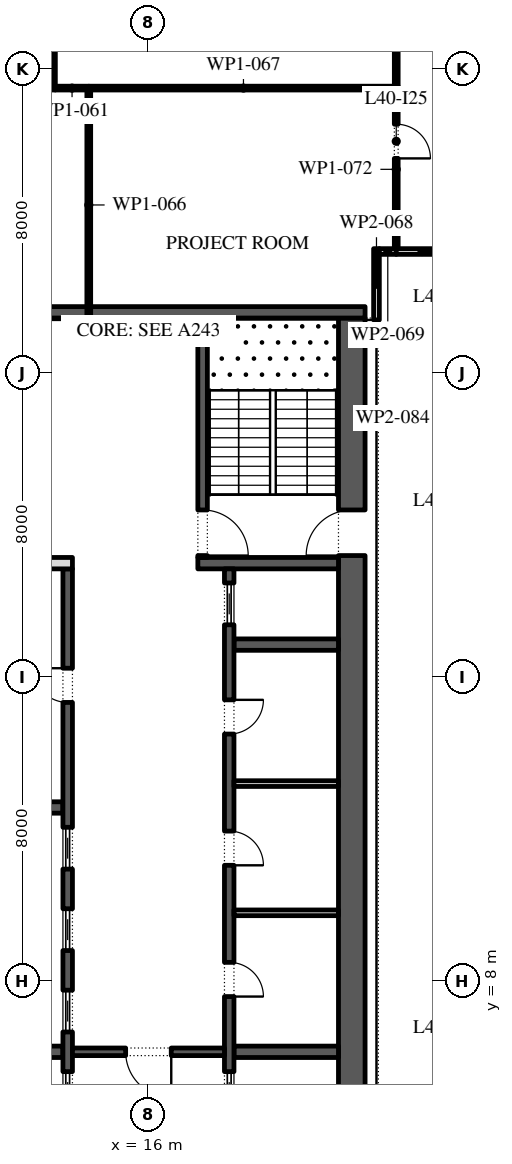
"""IFC4 building model, lengths in metres.
Left out: names, types, materials, properties, quantities, classifications, styles, units other than length and angle.
Written with IfcOpenShell. Run it as: python <this file> out.ifc"""

import sys

from ifc_helpers import new_model, si_unit, direction, frame, frame_2d, origin, place, context, subcontext, project, spatial, rectangle, extrude, element, fill, save


model = new_model("IFC4")
c1 = context("Model", 3, precision=1e-05, world=origin(), true_north=direction((0.0, 1.0)))
c2 = subcontext(c1, "Body", "Model", "MODEL_VIEW")
j1 = project(units=[si_unit("LENGTHUNIT", "METRE"), si_unit("PLANEANGLEUNIT", "RADIAN")], contexts=[c1])
p1 = place(None, origin())
s1 = spatial("IfcSite", under=j1, at=p1, CompositionType="ELEMENT")
p2 = place(p1, origin())
s2 = spatial("IfcBuilding", under=s1, at=p2, CompositionType="ELEMENT")
p3 = place(p2, frame((0.0, 0.0, 184.2)))
s3 = spatial("IfcBuildingStorey", under=s2, at=p3, CompositionType="ELEMENT", Elevation=184.2)
p4 = place(p3, frame((33.157, -5.092, 0.0), z_axis=(0.0, 0.0, 1.0), x_axis=(-0.224950279389, 0.974370243697, 0.0)))
e1 = element("IfcWall", 1, at=p4, inside=s3, PredefinedType="STANDARD", context=c2, shape_type="SweptSolid", body=[
    extrude(rectangle(XDim=49.5, YDim=0.3, at=frame_2d((24.75, 0.0))), origin(), (0.0, 0.0, 1.0), 4.0),
])
p5 = place(p4, frame((2.207, 0.0, 0.0)))
e2 = element("IfcOpeningElement", 2, at=p5, cuts=e1, PredefinedType="OPENING", context=c2, shape_type="SweptSolid", body=[
    extrude(rectangle(XDim=2.4, YDim=3.125, at=frame_2d((1.2, 1.562))), frame((0.0, 0.16, 0.0), z_axis=(0.0, -1.0, 0.0), x_axis=(1.0, 0.0, 0.0)), (0.0, 0.0, 1.0), 0.32),
])
p6 = place(p4, frame((8.121, 0.0, 0.45)))
e3 = element("IfcOpeningElement", 3, at=p6, cuts=e1, PredefinedType="OPENING", context=c2, shape_type="SweptSolid", body=[
    extrude(rectangle(XDim=4.5, YDim=2.875, at=frame_2d((2.25, 1.438))), frame((0.0, 0.16, 0.0), z_axis=(0.0, -1.0, 0.0), x_axis=(1.0, 0.0, 0.0)), (0.0, 0.0, 1.0), 0.32),
])
p7 = place(p4, frame((15.236, 0.0, 0.45)))
e4 = element("IfcOpeningElement", 4, at=p7, cuts=e1, PredefinedType="OPENING", context=c2, shape_type="SweptSolid", body=[
    extrude(rectangle(XDim=4.5, YDim=2.875, at=frame_2d((2.25, 1.438))), frame((0.0, 0.16, 0.0), z_axis=(0.0, -1.0, 0.0), x_axis=(1.0, 0.0, 0.0)), (0.0, 0.0, 1.0), 0.32),
])
p8 = place(p4, frame((22.35, 0.0, 0.45)))
e5 = element("IfcOpeningElement", 5, at=p8, cuts=e1, PredefinedType="OPENING", context=c2, shape_type="SweptSolid", body=[
    extrude(rectangle(XDim=4.5, YDim=3.0, at=frame_2d((2.25, 1.5))), frame((0.0, 0.16, 0.0), z_axis=(0.0, -1.0, 0.0), x_axis=(1.0, 0.0, 0.0)), (0.0, 0.0, 1.0), 0.32),
])
p9 = place(p4, frame((30.514, 0.0, 0.0)))
e6 = element("IfcOpeningElement", 6, at=p9, cuts=e1, PredefinedType="OPENING", context=c2, shape_type="SweptSolid", body=[
    extrude(rectangle(XDim=2.4, YDim=3.45, at=frame_2d((1.2, 1.725))), frame((0.0, 0.16, 0.0), z_axis=(0.0, -1.0, 0.0), x_axis=(1.0, 0.0, 0.0)), (0.0, 0.0, 1.0), 0.32),
])
p10 = place(p4, frame((36.579, 0.0, 0.45)))
e7 = element("IfcOpeningElement", 7, at=p10, cuts=e1, PredefinedType="OPENING", context=c2, shape_type="SweptSolid", body=[
    extrude(rectangle(XDim=4.5, YDim=3.05, at=frame_2d((2.25, 1.525))), frame((0.0, 0.16, 0.0), z_axis=(0.0, -1.0, 0.0), x_axis=(1.0, 0.0, 0.0)), (0.0, 0.0, 1.0), 0.32),
])
p11 = place(p4, frame((43.693, 0.0, 0.45)))
e8 = element("IfcOpeningElement", 8, at=p11, cuts=e1, PredefinedType="OPENING", context=c2, shape_type="SweptSolid", body=[
    extrude(rectangle(XDim=4.5, YDim=3.05, at=frame_2d((2.25, 1.525))), frame((0.0, 0.16, 0.0), z_axis=(0.0, -1.0, 0.0), x_axis=(1.0, 0.0, 0.0)), (0.0, 0.0, 1.0), 0.32),
])
p12 = place(p3, frame((21.35, -2.45, 0.0), z_axis=(0.0, 0.0, 1.0), x_axis=(0.0, 1.0, 0.0)))
e9 = element("IfcWall", 9, at=p12, inside=s3, PredefinedType="SHEAR", context=c2, shape_type="SweptSolid", body=[
    extrude(rectangle(XDim=27.9, YDim=0.7, at=frame_2d((13.95, 0.0))), origin(), (0.0, 0.0, 1.0), 4.0),
])
p13 = place(p12, frame((5.05, 0.0, 0.0)))
e10 = element("IfcOpeningElement", 10, at=p13, cuts=e9, PredefinedType="OPENING", context=c2, shape_type="SweptSolid", body=[
    extrude(rectangle(XDim=1.2, YDim=2.1, at=frame_2d((0.6, 1.05))), frame((0.0, 0.36, 0.0), z_axis=(0.0, -1.0, 0.0), x_axis=(1.0, 0.0, 0.0)), (0.0, 0.0, 1.0), 0.72),
])
p14 = place(p12, frame((21.65, 0.0, 0.0)))
e11 = element("IfcOpeningElement", 11, at=p14, cuts=e9, PredefinedType="OPENING", context=c2, shape_type="SweptSolid", body=[
    extrude(rectangle(XDim=1.2, YDim=2.1, at=frame_2d((0.6, 1.05))), frame((0.0, 0.36, 0.0), z_axis=(0.0, -1.0, 0.0), x_axis=(1.0, 0.0, 0.0)), (0.0, 0.0, 1.0), 0.72),
])
p15 = place(p3, frame((10.3, 25.6, 0.0), z_axis=(0.0, 0.0, 1.0), x_axis=(1.0, 0.0, 0.0)))
e12 = element("IfcWall", 12, at=p15, inside=s3, PredefinedType="SHEAR", context=c2, shape_type="SweptSolid", body=[
    extrude(rectangle(XDim=11.4, YDim=0.3, at=frame_2d((5.7, 0.0))), origin(), (0.0, 0.0, 1.0), 4.0),
])
p16 = place(p3, frame((17.3, 19.0, 0.0), z_axis=(0.0, 0.0, 1.0), x_axis=(1.0, 0.0, 0.0)))
e13 = element("IfcWall", 13, at=p16, inside=s3, PredefinedType="SHEAR", context=c2, shape_type="SweptSolid", body=[
    extrude(rectangle(XDim=3.7, YDim=0.3, at=frame_2d((1.85, 0.0))), origin(), (0.0, 0.0, 1.0), 4.0),
])
p17 = place(p3, frame((17.425, 19.15, 0.0), z_axis=(0.0, 0.0, 1.0), x_axis=(0.0, 1.0, 0.0)))
e14 = element("IfcWall", 14, at=p17, inside=s3, PredefinedType="SHEAR", context=c2, shape_type="SweptSolid", body=[
    extrude(rectangle(XDim=6.3, YDim=0.25, at=frame_2d((3.15, 0.0))), origin(), (0.0, 0.0, 1.0), 4.0),
])
p18 = place(p17, frame((0.05, 0.0, 0.0)))
e15 = element("IfcOpeningElement", 15, at=p18, cuts=e14, PredefinedType="OPENING", context=c2, shape_type="SweptSolid", body=[
    extrude(rectangle(XDim=1.2, YDim=2.1, at=frame_2d((0.6, 1.05))), frame((0.0, 0.135, 0.0), z_axis=(0.0, -1.0, 0.0), x_axis=(1.0, 0.0, 0.0)), (0.0, 0.0, 1.0), 0.27),
])
for number, where, z_axis, x_axis in (
    (16, (18.25, 6.143, 0.0), (0.0, 0.0, 1.0), (1.0, 0.0, 0.0)),
    (17, (18.25, 16.857, 0.0), (0.0, 0.0, 1.0), (1.0, 0.0, 0.0)),
):
    element("IfcWall", number, at=place(p3, frame(where, z_axis=z_axis, x_axis=x_axis)), inside=s3, PredefinedType="SHEAR", context=c2, shape_type="SweptSolid", body=[
        extrude(rectangle(XDim=2.75, YDim=0.3, at=frame_2d((1.375, 0.0))), origin(), (0.0, 0.0, 1.0), 4.0),
    ])
p19 = place(p3, frame((18.125, 4.15, 0.0), z_axis=(0.0, 0.0, 1.0), x_axis=(0.0, 1.0, 0.0)))
e18 = element("IfcWall", 18, at=p19, inside=s3, PredefinedType="SHEAR", context=c2, shape_type="SweptSolid", body=[
    extrude(rectangle(XDim=14.7, YDim=0.25, at=frame_2d((7.35, 0.0))), origin(), (0.0, 0.0, 1.0), 4.0),
])
p20 = place(p19, frame((3.446, 0.0, 0.0)))
e19 = element("IfcOpeningElement", 19, at=p20, cuts=e18, PredefinedType="OPENING", context=c2, shape_type="SweptSolid", body=[
    extrude(rectangle(XDim=0.9, YDim=2.1, at=frame_2d((0.45, 1.05))), frame((0.0, 0.135, 0.0), z_axis=(0.0, -1.0, 0.0), x_axis=(1.0, 0.0, 0.0)), (0.0, 0.0, 1.0), 0.27),
])
p21 = place(p19, frame((6.9, 0.0, 0.0)))
e20 = element("IfcOpeningElement", 20, at=p21, cuts=e18, PredefinedType="OPENING", context=c2, shape_type="SweptSolid", body=[
    extrude(rectangle(XDim=0.9, YDim=2.1, at=frame_2d((0.45, 1.05))), frame((0.0, 0.135, 0.0), z_axis=(0.0, -1.0, 0.0), x_axis=(1.0, 0.0, 0.0)), (0.0, 0.0, 1.0), 0.27),
])
p22 = place(p19, frame((10.354, 0.0, 0.0)))
e21 = element("IfcOpeningElement", 21, at=p22, cuts=e18, PredefinedType="OPENING", context=c2, shape_type="SweptSolid", body=[
    extrude(rectangle(XDim=0.9, YDim=2.1, at=frame_2d((0.45, 1.05))), frame((0.0, 0.135, 0.0), z_axis=(0.0, -1.0, 0.0), x_axis=(1.0, 0.0, 0.0)), (0.0, 0.0, 1.0), 0.27),
])
p23 = place(p19, frame((0.371, 0.0, 0.0)))
e22 = element("IfcOpeningElement", 22, at=p23, cuts=e18, PredefinedType="OPENING", context=c2, shape_type="SweptSolid", body=[
    extrude(rectangle(XDim=1.1, YDim=2.1, at=frame_2d((0.55, 1.05))), frame((0.0, 0.135, 0.0), z_axis=(0.0, -1.0, 0.0), x_axis=(1.0, 0.0, 0.0)), (0.0, 0.0, 1.0), 0.27),
])
p24 = place(p19, frame((13.229, 0.0, 0.0)))
e23 = element("IfcOpeningElement", 23, at=p24, cuts=e18, PredefinedType="OPENING", context=c2, shape_type="SweptSolid", body=[
    extrude(rectangle(XDim=1.1, YDim=2.1, at=frame_2d((0.55, 1.05))), frame((0.0, 0.135, 0.0), z_axis=(0.0, -1.0, 0.0), x_axis=(1.0, 0.0, 0.0)), (0.0, 0.0, 1.0), 0.27),
])
for number, where, z_axis, x_axis in (
    (24, (18.25, 9.8, 0.0), (0.0, 0.0, 1.0), (1.0, 0.0, 0.0)),
    (25, (18.25, 13.2, 0.0), (0.0, 0.0, 1.0), (1.0, 0.0, 0.0)),
):
    element("IfcWall", number, at=place(p3, frame(where, z_axis=z_axis, x_axis=x_axis)), inside=s3, PredefinedType="PARTITIONING", context=c2, shape_type="SweptSolid", body=[
        extrude(rectangle(XDim=2.75, YDim=0.15, at=frame_2d((1.375, 0.0))), origin(), (0.0, 0.0, 1.0), 4.0),
    ])
for number, where, z_axis, x_axis in (
    (26, (11.0, 6.143, 0.0), (0.0, 0.0, 1.0), (1.0, 0.0, 0.0)),
    (27, (11.0, 12.571, 0.0), (0.0, 0.0, 1.0), (1.0, 0.0, 0.0)),
):
    element("IfcWall", number, at=place(p3, frame(where, z_axis=z_axis, x_axis=x_axis)), inside=s3, PredefinedType="SHEAR", context=c2, shape_type="SweptSolid", body=[
        extrude(rectangle(XDim=2.75, YDim=0.3, at=frame_2d((1.375, 0.0))), origin(), (0.0, 0.0, 1.0), 4.0),
    ])
p25 = place(p3, frame((13.875, -2.45, 0.0), z_axis=(0.0, 0.0, 1.0), x_axis=(0.0, 1.0, 0.0)))
e28 = element("IfcWall", 28, at=p25, inside=s3, PredefinedType="SHEAR", context=c2, shape_type="SweptSolid", body=[
    extrude(rectangle(XDim=21.3, YDim=0.25, at=frame_2d((10.65, 0.0))), origin(), (0.0, 0.0, 1.0), 4.0),
])
p26 = place(p25, frame((17.786, 0.0, 0.0)))
e29 = element("IfcOpeningElement", 29, at=p26, cuts=e28, PredefinedType="OPENING", context=c2, shape_type="SweptSolid", body=[
    extrude(rectangle(XDim=0.9, YDim=2.1, at=frame_2d((0.45, 1.05))), frame((0.0, 0.135, 0.0), z_axis=(0.0, -1.0, 0.0), x_axis=(1.0, 0.0, 0.0)), (0.0, 0.0, 1.0), 0.27),
])
p27 = place(p25, frame((6.971, 0.0, 0.0)))
e30 = element("IfcOpeningElement", 30, at=p27, cuts=e28, PredefinedType="OPENING", context=c2, shape_type="SweptSolid", body=[
    extrude(rectangle(XDim=1.1, YDim=2.1, at=frame_2d((0.55, 1.05))), frame((0.0, 0.135, 0.0), z_axis=(0.0, -1.0, 0.0), x_axis=(1.0, 0.0, 0.0)), (0.0, 0.0, 1.0), 0.27),
])
p28 = place(p25, frame((9.114, 0.0, 0.0)))
e31 = element("IfcOpeningElement", 31, at=p28, cuts=e28, PredefinedType="OPENING", context=c2, shape_type="SweptSolid", body=[
    extrude(rectangle(XDim=1.1, YDim=2.1, at=frame_2d((0.55, 1.05))), frame((0.0, 0.135, 0.0), z_axis=(0.0, -1.0, 0.0), x_axis=(1.0, 0.0, 0.0)), (0.0, 0.0, 1.0), 0.27),
])
p29 = place(p25, frame((11.257, 0.0, 0.0)))
e32 = element("IfcOpeningElement", 32, at=p29, cuts=e28, PredefinedType="OPENING", context=c2, shape_type="SweptSolid", body=[
    extrude(rectangle(XDim=1.1, YDim=2.1, at=frame_2d((0.55, 1.05))), frame((0.0, 0.135, 0.0), z_axis=(0.0, -1.0, 0.0), x_axis=(1.0, 0.0, 0.0)), (0.0, 0.0, 1.0), 0.27),
])
p30 = place(p25, frame((13.4, 0.0, 0.0)))
e33 = element("IfcOpeningElement", 33, at=p30, cuts=e28, PredefinedType="OPENING", context=c2, shape_type="SweptSolid", body=[
    extrude(rectangle(XDim=1.1, YDim=2.1, at=frame_2d((0.55, 1.05))), frame((0.0, 0.135, 0.0), z_axis=(0.0, -1.0, 0.0), x_axis=(1.0, 0.0, 0.0)), (0.0, 0.0, 1.0), 0.27),
])
p31 = place(p3, frame((11.0, 19.0, 0.0), z_axis=(0.0, 0.0, 1.0), x_axis=(1.0, 0.0, 0.0)))
e34 = element("IfcWall", 34, at=p31, inside=s3, PredefinedType="PARTITIONING", context=c2, shape_type="SweptSolid", body=[
    extrude(rectangle(XDim=3.0, YDim=0.3, at=frame_2d((1.5, 0.0))), origin(), (0.0, 0.0, 1.0), 4.0),
])
p32 = place(p3, frame((14.0, 6.143, 0.0), z_axis=(0.0, 0.0, 1.0), x_axis=(1.0, 0.0, 0.0)))
e35 = element("IfcWall", 35, at=p32, inside=s3, PredefinedType="SHEAR", context=c2, shape_type="SweptSolid", body=[
    extrude(rectangle(XDim=4.0, YDim=0.2, at=frame_2d((2.0, 0.0))), origin(), (0.0, 0.0, 1.0), 4.0),
])
p33 = place(p32, frame((1.4, 0.0, 0.0)))
e36 = element("IfcOpeningElement", 36, at=p33, cuts=e35, PredefinedType="OPENING", context=c2, shape_type="SweptSolid", body=[
    extrude(rectangle(XDim=1.2, YDim=2.1, at=frame_2d((0.6, 1.05))), frame((0.0, 0.11, 0.0), z_axis=(0.0, -1.0, 0.0), x_axis=(1.0, 0.0, 0.0)), (0.0, 0.0, 1.0), 0.22),
])
p34 = place(p3, frame((9.78, 31.5, 0.0), z_axis=(0.0, 0.0, 1.0), x_axis=(1.0, 0.0, 0.0)))
e37 = element("IfcWall", 37, at=p34, inside=s3, PredefinedType="PARTITIONING", context=c2, shape_type="SweptSolid", body=[
    extrude(rectangle(XDim=3.77, YDim=0.1, at=frame_2d((1.885, 0.0))), origin(), (0.0, 0.0, 1.0), 4.0),
])
p35 = place(p3, frame((13.55, 31.5, 0.0), z_axis=(0.0, 0.0, 1.0), x_axis=(1.0, 0.0, 0.0)))
e38 = element("IfcWall", 38, at=p35, inside=s3, PredefinedType="PARTITIONING", context=c2, shape_type="SweptSolid", body=[
    extrude(rectangle(XDim=0.88, YDim=0.1, at=frame_2d((0.44, 0.0))), origin(), (0.0, 0.0, 1.0), 4.0),
])
p36 = place(p3, frame((13.5, 39.95, 0.0), z_axis=(0.0, 0.0, 1.0), x_axis=(0.0, -1.0, 0.0)))
e39 = element("IfcWall", 39, at=p36, inside=s3, PredefinedType="PARTITIONING", context=c2, shape_type="SweptSolid", body=[
    extrude(rectangle(XDim=8.4, YDim=0.1, at=frame_2d((4.2, 0.0))), origin(), (0.0, 0.0, 1.0), 4.0),
])
p37 = place(p3, frame((14.43, 31.45, 0.0), z_axis=(0.0, 0.0, 1.0), x_axis=(0.0, -1.0, 0.0)))
e40 = element("IfcWall", 40, at=p37, inside=s3, PredefinedType="PARTITIONING", context=c2, shape_type="SweptSolid", body=[
    extrude(rectangle(XDim=6.05, YDim=0.1, at=frame_2d((3.025, 0.0))), origin(), (0.0, 0.0, 1.0), 4.0),
])
p38 = place(p3, frame((14.43, 31.5, 0.0), z_axis=(0.0, 0.0, 1.0), x_axis=(1.0, 0.0, 0.0)))
e41 = element("IfcWall", 41, at=p38, inside=s3, PredefinedType="PARTITIONING", context=c2, shape_type="SweptSolid", body=[
    extrude(rectangle(XDim=8.14, YDim=0.1, at=frame_2d((4.07, 0.0))), origin(), (0.0, 0.0, 1.0), 4.0),
])
p39 = place(p3, frame((22.0, 25.4, 0.0), z_axis=(0.0, 0.0, 1.0), x_axis=(0.0, 1.0, 0.0)))
e42 = element("IfcWall", 42, at=p39, inside=s3, PredefinedType="PARTITIONING", context=c2, shape_type="SweptSolid", body=[
    extrude(rectangle(XDim=1.875, YDim=0.15, at=frame_2d((0.938, 0.0))), origin(), (0.0, 0.0, 1.0), 4.0),
])
p40 = place(p3, frame((22.075, 27.2, 0.0), z_axis=(0.0, 0.0, 1.0), x_axis=(1.0, 0.0, 0.0)))
e43 = element("IfcWall", 43, at=p40, inside=s3, PredefinedType="PARTITIONING", context=c2, shape_type="SweptSolid", body=[
    extrude(rectangle(XDim=0.445, YDim=0.15, at=frame_2d((0.223, 0.0))), origin(), (0.0, 0.0, 1.0), 4.0),
])
p41 = place(p3, frame((22.52, 27.275, 0.0), z_axis=(0.0, 0.0, 1.0), x_axis=(0.0, 1.0, 0.0)))
e44 = element("IfcWall", 44, at=p41, inside=s3, PredefinedType="PARTITIONING", context=c2, shape_type="SweptSolid", body=[
    extrude(rectangle(XDim=4.175, YDim=0.1, at=frame_2d((2.087, 0.0))), origin(), (0.0, 0.0, 1.0), 4.0),
])
p42 = place(p41, frame((2.375, 0.0, 0.0)))
e45 = element("IfcOpeningElement", 45, at=p42, cuts=e44, PredefinedType="OPENING", context=c2, shape_type="SweptSolid", body=[
    extrude(rectangle(XDim=0.9, YDim=2.1, at=frame_2d((0.45, 1.05))), frame((0.0, 0.06, 0.0), z_axis=(0.0, -1.0, 0.0), x_axis=(1.0, 0.0, 0.0)), (0.0, 0.0, 1.0), 0.12),
])
p43 = place(p3, frame((22.52, 27.2, 0.0), z_axis=(0.0, 0.0, 1.0), x_axis=(1.0, 0.0, 0.0)))
e46 = element("IfcWall", 46, at=p43, inside=s3, PredefinedType="PARTITIONING", context=c2, shape_type="SweptSolid", body=[
    extrude(rectangle(XDim=1.355, YDim=0.15, at=frame_2d((0.677, 0.0))), origin(), (0.0, 0.0, 1.0), 4.0),
])
p44 = place(p3, frame((22.52, 31.55, 0.0), z_axis=(0.0, 0.0, 1.0), x_axis=(0.0, 1.0, 0.0)))
e47 = element("IfcWall", 47, at=p44, inside=s3, PredefinedType="PARTITIONING", context=c2, shape_type="SweptSolid", body=[
    extrude(rectangle(XDim=5.55, YDim=0.1, at=frame_2d((2.775, 0.0))), origin(), (0.0, 0.0, 1.0), 4.0),
])
p45 = place(p20, frame((0.9, -0.2, 0.0), z_axis=(0.0, 0.0, 1.0), x_axis=(-1.0, 0.0, 0.0)))
e48 = element("IfcDoor", 48, at=p45, inside=s3, OperationType="SINGLE_SWING_LEFT", PredefinedType="DOOR", context=c2, shape_type="SweptSolid", body=[
    extrude(rectangle(XDim=0.9, YDim=2.1, at=frame_2d((0.45, 1.05))), frame((0.0, -0.075, 0.0), z_axis=(0.0, -1.0, 0.0), x_axis=(1.0, 0.0, 0.0)), (0.0, 0.0, 1.0), 0.05),
])
fill(e19, e48)
p46 = place(p21, frame((0.9, -0.2, 0.0), z_axis=(0.0, 0.0, 1.0), x_axis=(-1.0, 0.0, 0.0)))
e49 = element("IfcDoor", 49, at=p46, inside=s3, OperationType="SINGLE_SWING_LEFT", PredefinedType="DOOR", context=c2, shape_type="SweptSolid", body=[
    extrude(rectangle(XDim=0.9, YDim=2.1, at=frame_2d((0.45, 1.05))), frame((0.0, -0.075, 0.0), z_axis=(0.0, -1.0, 0.0), x_axis=(1.0, 0.0, 0.0)), (0.0, 0.0, 1.0), 0.05),
])
fill(e20, e49)
p47 = place(p22, frame((0.9, -0.2, 0.0), z_axis=(0.0, 0.0, 1.0), x_axis=(-1.0, 0.0, 0.0)))
e50 = element("IfcDoor", 50, at=p47, inside=s3, OperationType="SINGLE_SWING_RIGHT", PredefinedType="DOOR", context=c2, shape_type="SweptSolid", body=[
    extrude(rectangle(XDim=0.9, YDim=2.1, at=frame_2d((0.45, 1.05))), frame((0.0, -0.075, 0.0), z_axis=(0.0, -1.0, 0.0), x_axis=(1.0, 0.0, 0.0)), (0.0, 0.0, 1.0), 0.05),
])
fill(e21, e50)
p48 = place(p23, origin())
e51 = element("IfcDoor", 51, at=p48, inside=s3, OperationType="SLIDING_TO_LEFT", PredefinedType="DOOR", context=c2, shape_type="SweptSolid", body=[
    extrude(rectangle(XDim=1.1, YDim=2.1, at=frame_2d((0.55, 1.05))), frame((0.0, 0.025, 0.0), z_axis=(0.0, -1.0, 0.0), x_axis=(1.0, 0.0, 0.0)), (0.0, 0.0, 1.0), 0.05),
])
fill(e22, e51)
p49 = place(p24, origin())
e52 = element("IfcDoor", 52, at=p49, inside=s3, OperationType="SLIDING_TO_LEFT", PredefinedType="DOOR", context=c2, shape_type="SweptSolid", body=[
    extrude(rectangle(XDim=1.1, YDim=2.1, at=frame_2d((0.55, 1.05))), frame((0.0, 0.025, 0.0), z_axis=(0.0, -1.0, 0.0), x_axis=(1.0, 0.0, 0.0)), (0.0, 0.0, 1.0), 0.05),
])
fill(e23, e52)
p50 = place(p26, origin())
e53 = element("IfcDoor", 53, at=p50, inside=s3, OperationType="SINGLE_SWING_LEFT", PredefinedType="DOOR", context=c2, shape_type="SweptSolid", body=[
    extrude(rectangle(XDim=0.9, YDim=2.1, at=frame_2d((0.45, 1.05))), frame((0.0, 0.125, 0.0), z_axis=(0.0, -1.0, 0.0), x_axis=(1.0, 0.0, 0.0)), (0.0, 0.0, 1.0), 0.05),
])
fill(e29, e53)
p51 = place(p27, origin())
e54 = element("IfcDoor", 54, at=p51, inside=s3, OperationType="SLIDING_TO_LEFT", PredefinedType="DOOR", context=c2, shape_type="SweptSolid", body=[
    extrude(rectangle(XDim=1.1, YDim=2.1, at=frame_2d((0.55, 1.05))), frame((0.0, 0.025, 0.0), z_axis=(0.0, -1.0, 0.0), x_axis=(1.0, 0.0, 0.0)), (0.0, 0.0, 1.0), 0.05),
])
fill(e30, e54)
p52 = place(p28, origin())
e55 = element("IfcDoor", 55, at=p52, inside=s3, OperationType="SLIDING_TO_LEFT", PredefinedType="DOOR", context=c2, shape_type="SweptSolid", body=[
    extrude(rectangle(XDim=1.1, YDim=2.1, at=frame_2d((0.55, 1.05))), frame((0.0, 0.025, 0.0), z_axis=(0.0, -1.0, 0.0), x_axis=(1.0, 0.0, 0.0)), (0.0, 0.0, 1.0), 0.05),
])
fill(e31, e55)
p53 = place(p29, origin())
e56 = element("IfcDoor", 56, at=p53, inside=s3, OperationType="SLIDING_TO_LEFT", PredefinedType="DOOR", context=c2, shape_type="SweptSolid", body=[
    extrude(rectangle(XDim=1.1, YDim=2.1, at=frame_2d((0.55, 1.05))), frame((0.0, 0.025, 0.0), z_axis=(0.0, -1.0, 0.0), x_axis=(1.0, 0.0, 0.0)), (0.0, 0.0, 1.0), 0.05),
])
fill(e32, e56)
p54 = place(p30, origin())
e57 = element("IfcDoor", 57, at=p54, inside=s3, OperationType="SLIDING_TO_LEFT", PredefinedType="DOOR", context=c2, shape_type="SweptSolid", body=[
    extrude(rectangle(XDim=1.1, YDim=2.1, at=frame_2d((0.55, 1.05))), frame((0.0, 0.025, 0.0), z_axis=(0.0, -1.0, 0.0), x_axis=(1.0, 0.0, 0.0)), (0.0, 0.0, 1.0), 0.05),
])
fill(e33, e57)
p55 = place(p33, frame((1.2, 0.0, 0.0), z_axis=(0.0, 0.0, 1.0), x_axis=(-1.0, 0.0, 0.0)))
e58 = element("IfcDoor", 58, at=p55, inside=s3, OperationType="SINGLE_SWING_RIGHT", PredefinedType="DOOR", context=c2, shape_type="SweptSolid", body=[
    extrude(rectangle(XDim=1.2, YDim=2.1, at=frame_2d((0.6, 1.05))), frame((0.0, 0.025, 0.0), z_axis=(0.0, -1.0, 0.0), x_axis=(1.0, 0.0, 0.0)), (0.0, 0.0, 1.0), 0.05),
])
fill(e36, e58)
p56 = place(p18, frame((1.2, 0.0, 0.0), z_axis=(0.0, 0.0, 1.0), x_axis=(-1.0, 0.0, 0.0)))
e59 = element("IfcDoor", 59, at=p56, inside=s3, OperationType="SINGLE_SWING_LEFT", PredefinedType="DOOR", context=c2, shape_type="SweptSolid", body=[
    extrude(rectangle(XDim=1.2, YDim=2.1, at=frame_2d((0.6, 1.05))), frame((0.0, 0.025, 0.0), z_axis=(0.0, -1.0, 0.0), x_axis=(1.0, 0.0, 0.0)), (0.0, 0.0, 1.0), 0.05),
])
fill(e15, e59)
p57 = place(p14, origin())
e60 = element("IfcDoor", 60, at=p57, inside=s3, OperationType="SINGLE_SWING_RIGHT", PredefinedType="DOOR", context=c2, shape_type="SweptSolid", body=[
    extrude(rectangle(XDim=1.2, YDim=2.1, at=frame_2d((0.6, 1.05))), frame((0.0, 0.025, 0.0), z_axis=(0.0, -1.0, 0.0), x_axis=(1.0, 0.0, 0.0)), (0.0, 0.0, 1.0), 0.05),
])
fill(e11, e60)
p58 = place(p42, frame((0.9, 0.0, 0.0), z_axis=(0.0, 0.0, 1.0), x_axis=(-1.0, 0.0, 0.0)))
e61 = element("IfcDoor", 61, at=p58, inside=s3, OperationType="SINGLE_SWING_LEFT", PredefinedType="DOOR", context=c2, shape_type="SweptSolid", body=[
    extrude(rectangle(XDim=0.9, YDim=2.1, at=frame_2d((0.45, 1.05))), frame((0.0, 0.025, 0.0), z_axis=(0.0, -1.0, 0.0), x_axis=(1.0, 0.0, 0.0)), (0.0, 0.0, 1.0), 0.05),
])
fill(e45, e61)
save(model, sys.argv[1])
